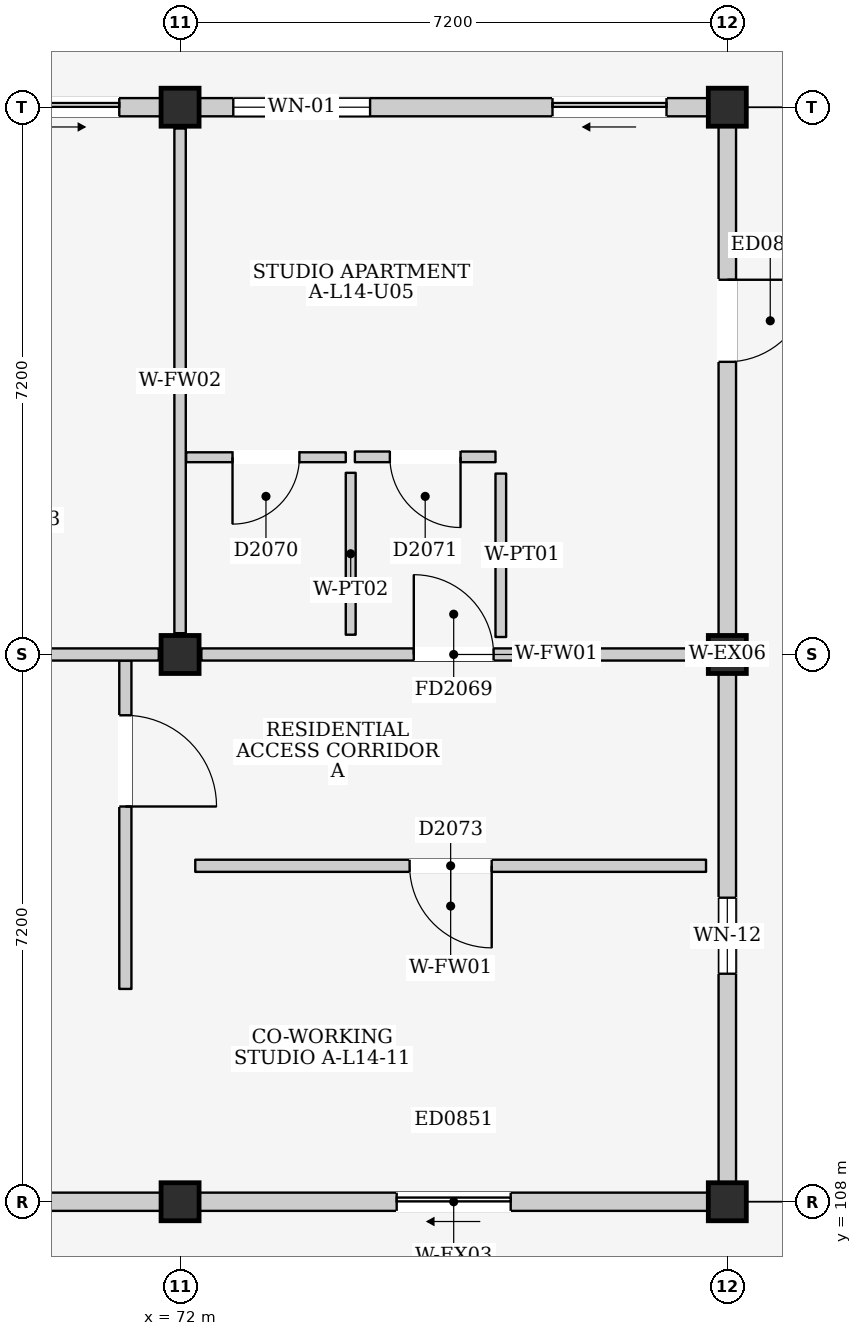
"""IFC4 building model, lengths in metres.
Left out: names, types, materials, properties, quantities, classifications, styles, units other than length and angle.
Written with IfcOpenShell. Run it as: python <this file> out.ifc"""

import sys

from ifc_helpers import new_model, si_unit, direction, frame, frame_2d, origin, origin_2d, place, context, subcontext, project, spatial, rectangle, extrude, element, fill, save


model = new_model("IFC4")
c1 = context("Model", 3, precision=1e-05, world=origin(), true_north=direction((0.0, 1.0)))
c2 = subcontext(c1, "Body", "Model", "MODEL_VIEW")
j1 = project(units=[si_unit("LENGTHUNIT", "METRE"), si_unit("PLANEANGLEUNIT", "RADIAN")], contexts=[c1])
p1 = place(None, origin())
s1 = spatial("IfcSite", under=j1, at=p1, CompositionType="ELEMENT")
p2 = place(p1, origin())
s2 = spatial("IfcBuilding", under=s1, at=p2, CompositionType="ELEMENT")
p3 = place(p2, frame((0.0, 0.0, 47.7)))
s3 = spatial("IfcBuildingStorey", under=s2, at=p3, CompositionType="ELEMENT", Elevation=47.7)
for number, where, z_axis, x_axis in (
    (1, (72.0, 108.0, 0.0), (0.0, 0.0, 1.0), (1.0, 0.0, 0.0)),
    (2, (72.0, 115.2, 0.0), (0.0, 0.0, 1.0), (1.0, 0.0, 0.0)),
    (3, (72.0, 122.4, 0.0), (0.0, 0.0, 1.0), (1.0, 0.0, 0.0)),
    (4, (79.2, 108.0, 0.0), (0.0, 0.0, 1.0), (1.0, 0.0, 0.0)),
    (5, (79.2, 115.2, 0.0), (0.0, 0.0, 1.0), (1.0, 0.0, 0.0)),
    (6, (79.2, 122.4, 0.0), (0.0, 0.0, 1.0), (1.0, 0.0, 0.0)),
):
    element("IfcColumn", number, at=place(p3, frame(where, z_axis=z_axis, x_axis=x_axis)), inside=s3, PredefinedType="COLUMN", context=c2, shape_type="SweptSolid", body=[
        extrude(rectangle(XDim=0.5, YDim=0.5, at=origin_2d()), origin(), (0.0, 0.0, 1.0), 3.2),
    ])
p4 = place(p3, frame((65.05, 122.4, 0.0), z_axis=(0.0, 0.0, 1.0), x_axis=(1.0, 0.0, 0.0)))
e7 = element("IfcWall", 7, at=p4, inside=s3, PredefinedType="ELEMENTEDWALL", context=c2, shape_type="SweptSolid", body=[
    extrude(rectangle(XDim=6.7, YDim=0.24, at=frame_2d((3.35, 0.0))), origin(), (0.0, 0.0, 1.0), 2.535),
])
p5 = place(p4, frame((4.55, 0.0, 0.0)))
e8 = element("IfcOpeningElement", 8, at=p5, cuts=e7, PredefinedType="OPENING", context=c2, shape_type="SweptSolid", body=[
    extrude(rectangle(XDim=1.6, YDim=2.12, at=frame_2d((0.8, 1.06))), frame((0.0, 0.135, 0.0), z_axis=(0.0, -1.0, 0.0), x_axis=(1.0, 0.0, 0.0)), (0.0, 0.0, 1.0), 0.27),
])
p6 = place(p4, frame((0.45, 0.0, 0.875)))
e9 = element("IfcOpeningElement", 9, at=p6, cuts=e7, PredefinedType="OPENING", context=c2, shape_type="SweptSolid", body=[
    extrude(rectangle(XDim=1.75, YDim=1.55, at=frame_2d((0.875, 0.775))), frame((0.0, 0.135, 0.0), z_axis=(0.0, -1.0, 0.0), x_axis=(1.0, 0.0, 0.0)), (0.0, 0.0, 1.0), 0.27),
])
p7 = place(p3, frame((65.05, 108.0, 0.0), z_axis=(0.0, 0.0, 1.0), x_axis=(1.0, 0.0, 0.0)))
e10 = element("IfcWall", 10, at=p7, inside=s3, PredefinedType="ELEMENTEDWALL", context=c2, shape_type="SweptSolid", body=[
    extrude(rectangle(XDim=6.7, YDim=0.24, at=frame_2d((3.35, 0.0))), origin(), (0.0, 0.0, 1.0), 2.335),
])
p8 = place(p7, frame((2.85, 0.0, 1.2)))
e11 = element("IfcOpeningElement", 11, at=p8, cuts=e10, PredefinedType="OPENING", context=c2, shape_type="SweptSolid", body=[
    extrude(rectangle(XDim=1.0, YDim=0.9, at=frame_2d((0.5, 0.45))), frame((0.0, 0.135, 0.0), z_axis=(0.0, -1.0, 0.0), x_axis=(1.0, 0.0, 0.0)), (0.0, 0.0, 1.0), 0.27),
])
p9 = place(p3, frame((72.25, 122.4, 0.0), z_axis=(0.0, 0.0, 1.0), x_axis=(1.0, 0.0, 0.0)))
e12 = element("IfcWall", 12, at=p9, inside=s3, PredefinedType="ELEMENTEDWALL", context=c2, shape_type="SweptSolid", body=[
    extrude(rectangle(XDim=6.7, YDim=0.24, at=frame_2d((3.35, 0.0))), origin(), (0.0, 0.0, 1.0), 2.535),
])
p10 = place(p9, frame((4.65, 0.0, 0.0)))
e13 = element("IfcOpeningElement", 13, at=p10, cuts=e12, PredefinedType="OPENING", context=c2, shape_type="SweptSolid", body=[
    extrude(rectangle(XDim=1.5, YDim=2.12, at=frame_2d((0.75, 1.06))), frame((0.0, 0.135, 0.0), z_axis=(0.0, -1.0, 0.0), x_axis=(1.0, 0.0, 0.0)), (0.0, 0.0, 1.0), 0.27),
])
p11 = place(p9, frame((0.45, 0.0, 0.9)))
e14 = element("IfcOpeningElement", 14, at=p11, cuts=e12, PredefinedType="OPENING", context=c2, shape_type="SweptSolid", body=[
    extrude(rectangle(XDim=1.8, YDim=1.5, at=frame_2d((0.9, 0.75))), frame((0.0, 0.135, 0.0), z_axis=(0.0, -1.0, 0.0), x_axis=(1.0, 0.0, 0.0)), (0.0, 0.0, 1.0), 0.27),
])
p12 = place(p3, frame((72.25, 108.0, 0.0), z_axis=(0.0, 0.0, 1.0), x_axis=(1.0, 0.0, 0.0)))
e15 = element("IfcWall", 15, at=p12, inside=s3, PredefinedType="ELEMENTEDWALL", context=c2, shape_type="SweptSolid", body=[
    extrude(rectangle(XDim=6.7, YDim=0.24, at=frame_2d((3.35, 0.0))), origin(), (0.0, 0.0, 1.0), 2.335),
])
p13 = place(p12, frame((2.6, 0.0, 0.0)))
e16 = element("IfcOpeningElement", 16, at=p13, cuts=e15, PredefinedType="OPENING", context=c2, shape_type="SweptSolid", body=[
    extrude(rectangle(XDim=1.5, YDim=2.12, at=frame_2d((0.75, 1.06))), frame((0.0, 0.135, 0.0), z_axis=(0.0, -1.0, 0.0), x_axis=(1.0, 0.0, 0.0)), (0.0, 0.0, 1.0), 0.27),
])
p14 = place(p3, frame((79.2, 108.25, 0.0), z_axis=(0.0, 0.0, 1.0), x_axis=(0.0, 1.0, 0.0)))
e17 = element("IfcWall", 17, at=p14, inside=s3, PredefinedType="ELEMENTEDWALL", context=c2, shape_type="SweptSolid", body=[
    extrude(rectangle(XDim=6.7, YDim=0.23, at=frame_2d((3.35, 0.0))), origin(), (0.0, 0.0, 1.0), 2.485),
])
p15 = place(p14, frame((2.75, 0.0, 1.1)))
e18 = element("IfcOpeningElement", 18, at=p15, cuts=e17, PredefinedType="OPENING", context=c2, shape_type="SweptSolid", body=[
    extrude(rectangle(XDim=1.0, YDim=0.9, at=frame_2d((0.5, 0.45))), frame((0.0, 0.13, 0.0), z_axis=(0.0, -1.0, 0.0), x_axis=(1.0, 0.0, 0.0)), (0.0, 0.0, 1.0), 0.26),
])
p16 = place(p3, frame((79.2, 115.45, 0.0), z_axis=(0.0, 0.0, 1.0), x_axis=(0.0, 1.0, 0.0)))
e19 = element("IfcWall", 19, at=p16, inside=s3, PredefinedType="ELEMENTEDWALL", context=c2, shape_type="SweptSolid", body=[
    extrude(rectangle(XDim=6.7, YDim=0.23, at=frame_2d((3.35, 0.0))), origin(), (0.0, 0.0, 1.0), 2.485),
])
p17 = place(p16, frame((3.6, 0.0, 0.0)))
e20 = element("IfcOpeningElement", 20, at=p17, cuts=e19, PredefinedType="OPENING", context=c2, shape_type="SweptSolid", body=[
    extrude(rectangle(XDim=1.08, YDim=2.12, at=frame_2d((0.54, 1.06))), frame((0.0, 0.13, 0.0), z_axis=(0.0, -1.0, 0.0), x_axis=(1.0, 0.0, 0.0)), (0.0, 0.0, 1.0), 0.26),
])
p18 = place(p3, frame((71.28, 110.8, 0.0), z_axis=(0.0, 0.0, 1.0), x_axis=(0.0, 1.0, 0.0)))
e21 = element("IfcWall", 21, at=p18, inside=s3, PredefinedType="PARTITIONING", context=c2, shape_type="SweptSolid", body=[
    extrude(rectangle(XDim=4.32, YDim=0.16, at=frame_2d((2.16, 0.0))), origin(), (0.0, 0.0, 1.0), 3.0),
])
p19 = place(p18, frame((2.4, 0.0, 0.0)))
e22 = element("IfcOpeningElement", 22, at=p19, cuts=e21, PredefinedType="OPENING", context=c2, shape_type="SweptSolid", body=[
    extrude(rectangle(XDim=1.2, YDim=2.2, at=frame_2d((0.6, 1.1))), frame((0.0, 0.095, 0.0), z_axis=(0.0, -1.0, 0.0), x_axis=(1.0, 0.0, 0.0)), (0.0, 0.0, 1.0), 0.19),
])
p20 = place(p3, frame((65.08, 115.2, 0.0), z_axis=(0.0, 0.0, 1.0), x_axis=(1.0, 0.0, 0.0)))
e23 = element("IfcWall", 23, at=p20, inside=s3, PredefinedType="PARTITIONING", context=c2, shape_type="SweptSolid", body=[
    extrude(rectangle(XDim=6.64, YDim=0.16, at=frame_2d((3.32, 0.0))), origin(), (0.0, 0.0, 1.0), 2.335),
])
p21 = place(p20, frame((2.795, 0.0, 0.0)))
e24 = element("IfcOpeningElement", 24, at=p21, cuts=e23, PredefinedType="OPENING", context=c2, shape_type="SweptSolid", body=[
    extrude(rectangle(XDim=1.05, YDim=2.15, at=frame_2d((0.525, 1.075))), frame((0.0, 0.095, 0.0), z_axis=(0.0, -1.0, 0.0), x_axis=(1.0, 0.0, 0.0)), (0.0, 0.0, 1.0), 0.19),
])
p22 = place(p3, frame((72.0, 115.48, 0.0), z_axis=(0.0, 0.0, 1.0), x_axis=(0.0, 1.0, 0.0)))
e25 = element("IfcWall", 25, at=p22, inside=s3, PredefinedType="PARTITIONING", context=c2, shape_type="SweptSolid", body=[
    extrude(rectangle(XDim=6.64, YDim=0.15, at=frame_2d((3.32, 0.0))), origin(), (0.0, 0.0, 1.0), 2.485),
])
p23 = place(p3, frame((72.28, 115.2, 0.0), z_axis=(0.0, 0.0, 1.0), x_axis=(1.0, 0.0, 0.0)))
e26 = element("IfcWall", 26, at=p23, inside=s3, PredefinedType="PARTITIONING", context=c2, shape_type="SweptSolid", body=[
    extrude(rectangle(XDim=6.64, YDim=0.16, at=frame_2d((3.32, 0.0))), origin(), (0.0, 0.0, 1.0), 2.335),
])
p24 = place(p23, frame((2.795, 0.0, 0.0)))
e27 = element("IfcOpeningElement", 27, at=p24, cuts=e26, PredefinedType="OPENING", context=c2, shape_type="SweptSolid", body=[
    extrude(rectangle(XDim=1.05, YDim=2.15, at=frame_2d((0.525, 1.075))), frame((0.0, 0.095, 0.0), z_axis=(0.0, -1.0, 0.0), x_axis=(1.0, 0.0, 0.0)), (0.0, 0.0, 1.0), 0.19),
])
p25 = place(p3, frame((72.08, 117.795, 0.0), z_axis=(0.0, 0.0, 1.0), x_axis=(1.0, 0.0, 0.0)))
e28 = element("IfcWall", 28, at=p25, inside=s3, PredefinedType="PARTITIONING", context=c2, shape_type="SweptSolid", body=[
    extrude(rectangle(XDim=2.1, YDim=0.13, at=frame_2d((1.05, 0.0))), origin(), (0.0, 0.0, 1.0), 3.0),
])
p26 = place(p25, frame((0.61, 0.0, 0.0)))
e29 = element("IfcOpeningElement", 29, at=p26, cuts=e28, PredefinedType="OPENING", context=c2, shape_type="SweptSolid", body=[
    extrude(rectangle(XDim=0.88, YDim=2.1, at=frame_2d((0.44, 1.05))), frame((0.0, 0.08, 0.0), z_axis=(0.0, -1.0, 0.0), x_axis=(1.0, 0.0, 0.0)), (0.0, 0.0, 1.0), 0.16),
])
p27 = place(p3, frame((74.245, 115.46, 0.0), z_axis=(0.0, 0.0, 1.0), x_axis=(0.0, 1.0, 0.0)))
e30 = element("IfcWall", 30, at=p27, inside=s3, PredefinedType="PARTITIONING", context=c2, shape_type="SweptSolid", body=[
    extrude(rectangle(XDim=2.13, YDim=0.13, at=frame_2d((1.065, 0.0))), origin(), (0.0, 0.0, 1.0), 3.0),
])
p28 = place(p3, frame((74.3, 117.8, 0.0), z_axis=(0.0, 0.0, 1.0), x_axis=(1.0, 0.0, 0.0)))
e31 = element("IfcWall", 31, at=p28, inside=s3, PredefinedType="PARTITIONING", context=c2, shape_type="SweptSolid", body=[
    extrude(rectangle(XDim=1.85, YDim=0.14, at=frame_2d((0.925, 0.0))), origin(), (0.0, 0.0, 1.0), 3.0),
])
p29 = place(p28, frame((0.46, 0.0, 0.0)))
e32 = element("IfcOpeningElement", 32, at=p29, cuts=e31, PredefinedType="OPENING", context=c2, shape_type="SweptSolid", body=[
    extrude(rectangle(XDim=0.93, YDim=2.14, at=frame_2d((0.465, 1.07))), frame((0.0, 0.085, 0.0), z_axis=(0.0, -1.0, 0.0), x_axis=(1.0, 0.0, 0.0)), (0.0, 0.0, 1.0), 0.17),
])
p30 = place(p3, frame((76.22, 115.43, 0.0), z_axis=(0.0, 0.0, 1.0), x_axis=(0.0, 1.0, 0.0)))
e33 = element("IfcWall", 33, at=p30, inside=s3, PredefinedType="PARTITIONING", context=c2, shape_type="SweptSolid", body=[
    extrude(rectangle(XDim=2.15, YDim=0.14, at=frame_2d((1.075, 0.0))), origin(), (0.0, 0.0, 1.0), 3.0),
])
p31 = place(p3, frame((72.2, 112.42, 0.0), z_axis=(0.0, 0.0, 1.0), x_axis=(1.0, 0.0, 0.0)))
e34 = element("IfcWall", 34, at=p31, inside=s3, PredefinedType="PARTITIONING", context=c2, shape_type="SweptSolid", body=[
    extrude(rectangle(XDim=6.72, YDim=0.16, at=frame_2d((3.36, 0.0))), origin(), (0.0, 0.0, 1.0), 3.0),
])
p32 = place(p31, frame((2.82, 0.0, 0.0)))
e35 = element("IfcOpeningElement", 35, at=p32, cuts=e34, PredefinedType="OPENING", context=c2, shape_type="SweptSolid", body=[
    extrude(rectangle(XDim=1.08, YDim=2.22, at=frame_2d((0.54, 1.11))), frame((0.0, 0.095, 0.0), z_axis=(0.0, -1.0, 0.0), x_axis=(1.0, 0.0, 0.0)), (0.0, 0.0, 1.0), 0.19),
])
p33 = place(p5, frame((1.6, 0.0, 0.0), z_axis=(0.0, 0.0, 1.0), x_axis=(-1.0, 0.0, 0.0)))
e36 = element("IfcDoor", 36, at=p33, inside=s3, OperationType="SLIDING_TO_RIGHT", PredefinedType="DOOR", context=c2, shape_type="SweptSolid", body=[
    extrude(rectangle(XDim=1.6, YDim=2.12, at=frame_2d((0.8, 1.06))), frame((0.0, 0.025, 0.0), z_axis=(0.0, -1.0, 0.0), x_axis=(1.0, 0.0, 0.0)), (0.0, 0.0, 1.0), 0.05),
])
fill(e8, e36)
p34 = place(p10, frame((1.5, 0.0, 0.0), z_axis=(0.0, 0.0, 1.0), x_axis=(-1.0, 0.0, 0.0)))
e37 = element("IfcDoor", 37, at=p34, inside=s3, OperationType="SLIDING_TO_LEFT", PredefinedType="DOOR", context=c2, shape_type="SweptSolid", body=[
    extrude(rectangle(XDim=1.5, YDim=2.12, at=frame_2d((0.75, 1.06))), frame((0.0, 0.025, 0.0), z_axis=(0.0, -1.0, 0.0), x_axis=(1.0, 0.0, 0.0)), (0.0, 0.0, 1.0), 0.05),
])
fill(e13, e37)
p35 = place(p11, origin())
e38 = element("IfcWindow", 38, at=p35, inside=s3, PartitioningType="DOUBLE_PANEL_VERTICAL", PredefinedType="WINDOW", context=c2, shape_type="SweptSolid", body=[
    extrude(rectangle(XDim=1.8, YDim=1.5, at=frame_2d((0.9, 0.75))), frame((0.0, 0.03, 0.0), z_axis=(0.0, -1.0, 0.0), x_axis=(1.0, 0.0, 0.0)), (0.0, 0.0, 1.0), 0.06),
])
fill(e14, e38)
p36 = place(p13, frame((1.5, 0.0, 0.0), z_axis=(0.0, 0.0, 1.0), x_axis=(-1.0, 0.0, 0.0)))
e39 = element("IfcDoor", 39, at=p36, inside=s3, OperationType="SLIDING_TO_LEFT", PredefinedType="DOOR", context=c2, shape_type="SweptSolid", body=[
    extrude(rectangle(XDim=1.5, YDim=2.12, at=frame_2d((0.75, 1.06))), frame((0.0, 0.025, 0.0), z_axis=(0.0, -1.0, 0.0), x_axis=(1.0, 0.0, 0.0)), (0.0, 0.0, 1.0), 0.05),
])
fill(e16, e39)
p37 = place(p15, origin())
e40 = element("IfcWindow", 40, at=p37, inside=s3, PartitioningType="SINGLE_PANEL", PredefinedType="WINDOW", context=c2, shape_type="SweptSolid", body=[
    extrude(rectangle(XDim=1.0, YDim=0.9, at=frame_2d((0.5, 0.45))), frame((0.0, 0.03, 0.0), z_axis=(0.0, -1.0, 0.0), x_axis=(1.0, 0.0, 0.0)), (0.0, 0.0, 1.0), 0.06),
])
fill(e18, e40)
p38 = place(p17, frame((1.08, 0.0, 0.0), z_axis=(0.0, 0.0, 1.0), x_axis=(-1.0, 0.0, 0.0)))
e41 = element("IfcDoor", 41, at=p38, inside=s3, OperationType="SINGLE_SWING_LEFT", PredefinedType="DOOR", context=c2, shape_type="SweptSolid", body=[
    extrude(rectangle(XDim=1.08, YDim=2.12, at=frame_2d((0.54, 1.06))), frame((0.0, 0.025, 0.0), z_axis=(0.0, -1.0, 0.0), x_axis=(1.0, 0.0, 0.0)), (0.0, 0.0, 1.0), 0.05),
])
fill(e20, e41)
p39 = place(p19, frame((1.2, 0.0, 0.0), z_axis=(0.0, 0.0, 1.0), x_axis=(-1.0, 0.0, 0.0)))
e42 = element("IfcDoor", 42, at=p39, inside=s3, OperationType="SINGLE_SWING_RIGHT", PredefinedType="DOOR", context=c2, shape_type="SweptSolid", body=[
    extrude(rectangle(XDim=1.2, YDim=2.2, at=frame_2d((0.6, 1.1))), frame((0.0, 0.025, 0.0), z_axis=(0.0, -1.0, 0.0), x_axis=(1.0, 0.0, 0.0)), (0.0, 0.0, 1.0), 0.05),
])
fill(e22, e42)
p40 = place(p24, origin())
e43 = element("IfcDoor", 43, at=p40, inside=s3, OperationType="SINGLE_SWING_LEFT", PredefinedType="DOOR", context=c2, shape_type="SweptSolid", body=[
    extrude(rectangle(XDim=1.05, YDim=2.15, at=frame_2d((0.525, 1.075))), frame((0.0, 0.025, 0.0), z_axis=(0.0, -1.0, 0.0), x_axis=(1.0, 0.0, 0.0)), (0.0, 0.0, 1.0), 0.05),
])
fill(e27, e43)
p41 = place(p26, frame((0.88, 0.0, 0.0), z_axis=(0.0, 0.0, 1.0), x_axis=(-1.0, 0.0, 0.0)))
e44 = element("IfcDoor", 44, at=p41, inside=s3, OperationType="SINGLE_SWING_RIGHT", PredefinedType="DOOR", context=c2, shape_type="SweptSolid", body=[
    extrude(rectangle(XDim=0.88, YDim=2.1, at=frame_2d((0.44, 1.05))), frame((0.0, 0.025, 0.0), z_axis=(0.0, -1.0, 0.0), x_axis=(1.0, 0.0, 0.0)), (0.0, 0.0, 1.0), 0.05),
])
fill(e29, e44)
p42 = place(p29, frame((0.93, 0.0, 0.0), z_axis=(0.0, 0.0, 1.0), x_axis=(-1.0, 0.0, 0.0)))
e45 = element("IfcDoor", 45, at=p42, inside=s3, OperationType="SINGLE_SWING_LEFT", PredefinedType="DOOR", context=c2, shape_type="SweptSolid", body=[
    extrude(rectangle(XDim=0.93, YDim=2.14, at=frame_2d((0.465, 1.07))), frame((0.0, 0.025, 0.0), z_axis=(0.0, -1.0, 0.0), x_axis=(1.0, 0.0, 0.0)), (0.0, 0.0, 1.0), 0.05),
])
fill(e32, e45)
p43 = place(p32, frame((1.08, 0.0, 0.0), z_axis=(0.0, 0.0, 1.0), x_axis=(-1.0, 0.0, 0.0)))
e46 = element("IfcDoor", 46, at=p43, inside=s3, OperationType="SINGLE_SWING_LEFT", PredefinedType="DOOR", context=c2, shape_type="SweptSolid", body=[
    extrude(rectangle(XDim=1.08, YDim=2.22, at=frame_2d((0.54, 1.11))), frame((0.0, 0.025, 0.0), z_axis=(0.0, -1.0, 0.0), x_axis=(1.0, 0.0, 0.0)), (0.0, 0.0, 1.0), 0.05),
])
fill(e35, e46)
save(model, sys.argv[1])
